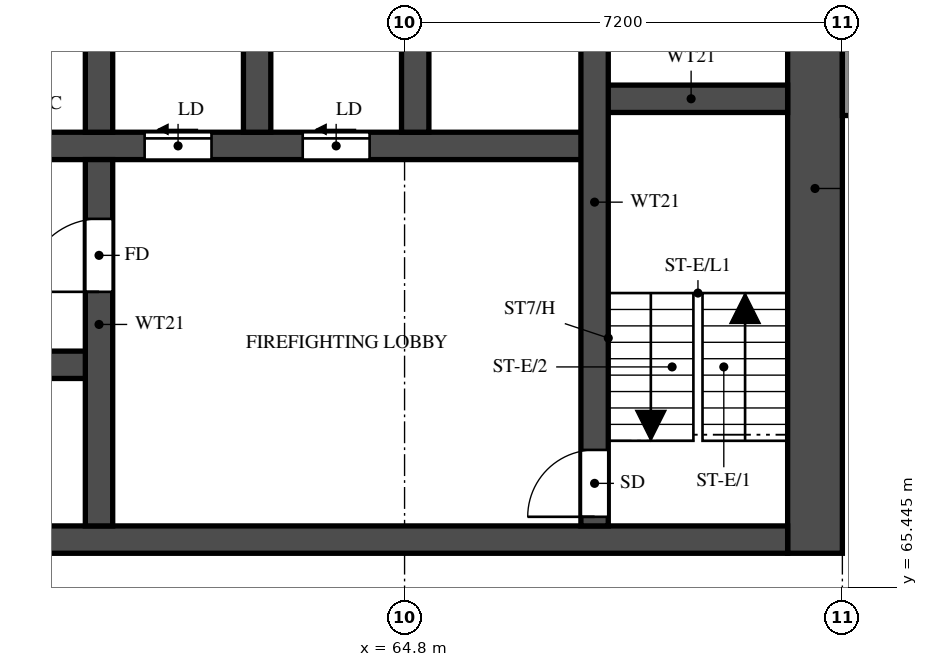
"""IFC4 building model, lengths in metres.
Left out: names, types, materials, properties, quantities, classifications, styles, units other than length and angle.
Written with IfcOpenShell. Run it as: python <this file> out.ifc"""

import sys

from ifc_helpers import new_model, si_unit, direction, frame, frame_2d, origin, place, context, subcontext, project, spatial, rectangle, extrude, element, fill, save


model = new_model("IFC4")
c1 = context("Model", 3, precision=1e-05, world=origin(), true_north=direction((0.0, 1.0)))
c2 = subcontext(c1, "Body", "Model", "MODEL_VIEW")
j1 = project(units=[si_unit("LENGTHUNIT", "METRE"), si_unit("PLANEANGLEUNIT", "RADIAN")], contexts=[c1])
p1 = place(None, origin())
s1 = spatial("IfcSite", under=j1, at=p1, CompositionType="ELEMENT")
p2 = place(p1, origin())
s2 = spatial("IfcBuilding", under=s1, at=p2, CompositionType="ELEMENT")
p3 = place(p2, frame((0.0, 0.0, 37.5)))
s3 = spatial("IfcBuildingStorey", under=s2, at=p3, CompositionType="ELEMENT", Elevation=37.5)
p4 = place(p3, frame((71.55, 66.0, 0.0), z_axis=(0.0, 0.0, 1.0), x_axis=(0.0, 1.0, 0.0)))
e1 = element("IfcWall", 1, at=p4, inside=s3, PredefinedType="SHEAR", context=c2, shape_type="SweptSolid", body=[
    extrude(rectangle(XDim=12.0, YDim=0.9, at=frame_2d((6.0, 0.0))), origin(), (0.0, 0.0, 1.0), 3.18),
])
p5 = place(p3, frame((29.7, 66.225, 0.0), z_axis=(0.0, 0.0, 1.0), x_axis=(1.0, 0.0, 0.0)))
e2 = element("IfcWall", 2, at=p5, inside=s3, PredefinedType="SHEAR", context=c2, shape_type="SweptSolid", body=[
    extrude(rectangle(XDim=41.4, YDim=0.45, at=frame_2d((20.7, 0.0))), origin(), (0.0, 0.0, 1.0), 3.18),
])
p6 = place(p5, frame((0.925, 0.0, 0.0)))
e3 = element("IfcOpeningElement", 3, at=p6, cuts=e2, PredefinedType="OPENING", context=c2, shape_type="SweptSolid", body=[
    extrude(rectangle(XDim=1.1, YDim=2.1, at=frame_2d((0.55, 1.05))), frame((0.0, 0.235, 0.0), z_axis=(0.0, -1.0, 0.0), x_axis=(1.0, 0.0, 0.0)), (0.0, 0.0, 1.0), 0.47),
])
p7 = place(p5, frame((3.738, 0.0, 0.0)))
e4 = element("IfcOpeningElement", 4, at=p7, cuts=e2, PredefinedType="OPENING", context=c2, shape_type="SweptSolid", body=[
    extrude(rectangle(XDim=1.8, YDim=2.1, at=frame_2d((0.9, 1.05))), frame((0.0, 0.235, 0.0), z_axis=(0.0, -1.0, 0.0), x_axis=(1.0, 0.0, 0.0)), (0.0, 0.0, 1.0), 0.47),
])
p8 = place(p3, frame((35.575, 69.1, 0.0), z_axis=(0.0, 0.0, 1.0), x_axis=(1.0, 0.0, 0.0)))
e5 = element("IfcWall", 5, at=p8, inside=s3, PredefinedType="SHEAR", context=c2, shape_type="SweptSolid", body=[
    extrude(rectangle(XDim=24.2, YDim=0.45, at=frame_2d((12.1, 0.0))), origin(), (0.0, 0.0, 1.0), 3.18),
])
p9 = place(p8, frame((1.05, 0.0, 0.0)))
e6 = element("IfcOpeningElement", 6, at=p9, cuts=e5, PredefinedType="OPENING", context=c2, shape_type="SweptSolid", body=[
    extrude(rectangle(XDim=1.1, YDim=2.1, at=frame_2d((0.55, 1.05))), frame((0.0, 0.235, 0.0), z_axis=(0.0, -1.0, 0.0), x_axis=(1.0, 0.0, 0.0)), (0.0, 0.0, 1.0), 0.47),
])
p10 = place(p8, frame((3.8, 0.0, 0.0)))
e7 = element("IfcOpeningElement", 7, at=p10, cuts=e5, PredefinedType="OPENING", context=c2, shape_type="SweptSolid", body=[
    extrude(rectangle(XDim=1.1, YDim=2.1, at=frame_2d((0.55, 1.05))), frame((0.0, 0.235, 0.0), z_axis=(0.0, -1.0, 0.0), x_axis=(1.0, 0.0, 0.0)), (0.0, 0.0, 1.0), 0.47),
])
p11 = place(p8, frame((6.55, 0.0, 0.0)))
e8 = element("IfcOpeningElement", 8, at=p11, cuts=e5, PredefinedType="OPENING", context=c2, shape_type="SweptSolid", body=[
    extrude(rectangle(XDim=1.1, YDim=2.1, at=frame_2d((0.55, 1.05))), frame((0.0, 0.235, 0.0), z_axis=(0.0, -1.0, 0.0), x_axis=(1.0, 0.0, 0.0)), (0.0, 0.0, 1.0), 0.47),
])
p12 = place(p8, frame((9.3, 0.0, 0.0)))
e9 = element("IfcOpeningElement", 9, at=p12, cuts=e5, PredefinedType="OPENING", context=c2, shape_type="SweptSolid", body=[
    extrude(rectangle(XDim=1.1, YDim=2.1, at=frame_2d((0.55, 1.05))), frame((0.0, 0.235, 0.0), z_axis=(0.0, -1.0, 0.0), x_axis=(1.0, 0.0, 0.0)), (0.0, 0.0, 1.0), 0.47),
])
p13 = place(p8, frame((12.05, 0.0, 0.0)))
e10 = element("IfcOpeningElement", 10, at=p13, cuts=e5, PredefinedType="OPENING", context=c2, shape_type="SweptSolid", body=[
    extrude(rectangle(XDim=1.1, YDim=2.1, at=frame_2d((0.55, 1.05))), frame((0.0, 0.235, 0.0), z_axis=(0.0, -1.0, 0.0), x_axis=(1.0, 0.0, 0.0)), (0.0, 0.0, 1.0), 0.47),
])
p14 = place(p8, frame((14.8, 0.0, 0.0)))
e11 = element("IfcOpeningElement", 11, at=p14, cuts=e5, PredefinedType="OPENING", context=c2, shape_type="SweptSolid", body=[
    extrude(rectangle(XDim=1.1, YDim=2.1, at=frame_2d((0.55, 1.05))), frame((0.0, 0.235, 0.0), z_axis=(0.0, -1.0, 0.0), x_axis=(1.0, 0.0, 0.0)), (0.0, 0.0, 1.0), 0.47),
])
p15 = place(p3, frame((32.875, 72.7, 0.0), z_axis=(0.0, 0.0, 1.0), x_axis=(1.0, 0.0, 0.0)))
e12 = element("IfcWall", 12, at=p15, inside=s3, PredefinedType="SHEAR", context=c2, shape_type="SweptSolid", body=[
    extrude(rectangle(XDim=35.05, YDim=0.45, at=frame_2d((17.525, 0.0))), origin(), (0.0, 0.0, 1.0), 3.18),
])
p16 = place(p15, frame((19.8, 0.0, 0.0)))
e13 = element("IfcOpeningElement", 13, at=p16, cuts=e12, PredefinedType="OPENING", context=c2, shape_type="SweptSolid", body=[
    extrude(rectangle(XDim=1.1, YDim=2.1, at=frame_2d((0.55, 1.05))), frame((0.0, 0.235, 0.0), z_axis=(0.0, -1.0, 0.0), x_axis=(1.0, 0.0, 0.0)), (0.0, 0.0, 1.0), 0.47),
])
p17 = place(p15, frame((27.65, 0.0, 0.0)))
e14 = element("IfcOpeningElement", 14, at=p17, cuts=e12, PredefinedType="OPENING", context=c2, shape_type="SweptSolid", body=[
    extrude(rectangle(XDim=1.1, YDim=2.1, at=frame_2d((0.55, 1.05))), frame((0.0, 0.235, 0.0), z_axis=(0.0, -1.0, 0.0), x_axis=(1.0, 0.0, 0.0)), (0.0, 0.0, 1.0), 0.47),
])
p18 = place(p15, frame((30.25, 0.0, 0.0)))
e15 = element("IfcOpeningElement", 15, at=p18, cuts=e12, PredefinedType="OPENING", context=c2, shape_type="SweptSolid", body=[
    extrude(rectangle(XDim=1.1, YDim=2.1, at=frame_2d((0.55, 1.05))), frame((0.0, 0.235, 0.0), z_axis=(0.0, -1.0, 0.0), x_axis=(1.0, 0.0, 0.0)), (0.0, 0.0, 1.0), 0.47),
])
p19 = place(p15, frame((3.75, 0.0, 0.0)))
e16 = element("IfcOpeningElement", 16, at=p19, cuts=e12, PredefinedType="OPENING", context=c2, shape_type="SweptSolid", body=[
    extrude(rectangle(XDim=1.1, YDim=2.1, at=frame_2d((0.55, 1.05))), frame((0.0, 0.235, 0.0), z_axis=(0.0, -1.0, 0.0), x_axis=(1.0, 0.0, 0.0)), (0.0, 0.0, 1.0), 0.47),
])
p20 = place(p15, frame((6.5, 0.0, 0.0)))
e17 = element("IfcOpeningElement", 17, at=p20, cuts=e12, PredefinedType="OPENING", context=c2, shape_type="SweptSolid", body=[
    extrude(rectangle(XDim=1.1, YDim=2.1, at=frame_2d((0.55, 1.05))), frame((0.0, 0.235, 0.0), z_axis=(0.0, -1.0, 0.0), x_axis=(1.0, 0.0, 0.0)), (0.0, 0.0, 1.0), 0.47),
])
p21 = place(p15, frame((9.25, 0.0, 0.0)))
e18 = element("IfcOpeningElement", 18, at=p21, cuts=e12, PredefinedType="OPENING", context=c2, shape_type="SweptSolid", body=[
    extrude(rectangle(XDim=1.1, YDim=2.1, at=frame_2d((0.55, 1.05))), frame((0.0, 0.235, 0.0), z_axis=(0.0, -1.0, 0.0), x_axis=(1.0, 0.0, 0.0)), (0.0, 0.0, 1.0), 0.47),
])
p22 = place(p15, frame((12.0, 0.0, 0.0)))
e19 = element("IfcOpeningElement", 19, at=p22, cuts=e12, PredefinedType="OPENING", context=c2, shape_type="SweptSolid", body=[
    extrude(rectangle(XDim=1.1, YDim=2.1, at=frame_2d((0.55, 1.05))), frame((0.0, 0.235, 0.0), z_axis=(0.0, -1.0, 0.0), x_axis=(1.0, 0.0, 0.0)), (0.0, 0.0, 1.0), 0.47),
])
p23 = place(p15, frame((14.75, 0.0, 0.0)))
e20 = element("IfcOpeningElement", 20, at=p23, cuts=e12, PredefinedType="OPENING", context=c2, shape_type="SweptSolid", body=[
    extrude(rectangle(XDim=1.1, YDim=2.1, at=frame_2d((0.55, 1.05))), frame((0.0, 0.235, 0.0), z_axis=(0.0, -1.0, 0.0), x_axis=(1.0, 0.0, 0.0)), (0.0, 0.0, 1.0), 0.47),
])
p24 = place(p15, frame((17.5, 0.0, 0.0)))
e21 = element("IfcOpeningElement", 21, at=p24, cuts=e12, PredefinedType="OPENING", context=c2, shape_type="SweptSolid", body=[
    extrude(rectangle(XDim=1.1, YDim=2.1, at=frame_2d((0.55, 1.05))), frame((0.0, 0.235, 0.0), z_axis=(0.0, -1.0, 0.0), x_axis=(1.0, 0.0, 0.0)), (0.0, 0.0, 1.0), 0.47),
])
p25 = place(p15, frame((0.913, 0.0, 0.0)))
e22 = element("IfcOpeningElement", 22, at=p25, cuts=e12, PredefinedType="OPENING", context=c2, shape_type="SweptSolid", body=[
    extrude(rectangle(XDim=1.1, YDim=2.1, at=frame_2d((0.55, 1.05))), frame((0.0, 0.235, 0.0), z_axis=(0.0, -1.0, 0.0), x_axis=(1.0, 0.0, 0.0)), (0.0, 0.0, 1.0), 0.47),
])
p26 = place(p3, frame((67.925, 73.475, 0.0), z_axis=(0.0, 0.0, 1.0), x_axis=(1.0, 0.0, 0.0)))
e23 = element("IfcWall", 23, at=p26, inside=s3, PredefinedType="SHEAR", context=c2, shape_type="SweptSolid", body=[
    extrude(rectangle(XDim=3.175, YDim=0.45, at=frame_2d((1.587, 0.0))), origin(), (0.0, 0.0, 1.0), 3.18),
])
p27 = place(p3, frame((67.925, 66.45, 0.0), z_axis=(0.0, 0.0, 1.0), x_axis=(0.0, 1.0, 0.0)))
e24 = element("IfcWall", 24, at=p27, inside=s3, PredefinedType="SHEAR", context=c2, shape_type="SweptSolid", body=[
    extrude(rectangle(XDim=10.65, YDim=0.45, at=frame_2d((5.325, 0.0))), origin(), (0.0, 0.0, 1.0), 3.18),
])
p28 = place(p27, frame((0.15, 0.0, 0.0)))
e25 = element("IfcOpeningElement", 25, at=p28, cuts=e24, PredefinedType="OPENING", context=c2, shape_type="SweptSolid", body=[
    extrude(rectangle(XDim=1.1, YDim=2.1, at=frame_2d((0.55, 1.05))), frame((0.0, 0.235, 0.0), z_axis=(0.0, -1.0, 0.0), x_axis=(1.0, 0.0, 0.0)), (0.0, 0.0, 1.0), 0.47),
])
p29 = place(p3, frame((59.775, 66.45, 0.0), z_axis=(0.0, 0.0, 1.0), x_axis=(0.0, 1.0, 0.0)))
e26 = element("IfcWall", 26, at=p29, inside=s3, PredefinedType="SHEAR", context=c2, shape_type="SweptSolid", body=[
    extrude(rectangle(XDim=6.025, YDim=0.45, at=frame_2d((3.013, 0.0))), origin(), (0.0, 0.0, 1.0), 3.18),
])
p30 = place(p29, frame((3.85, 0.0, 0.0)))
e27 = element("IfcOpeningElement", 27, at=p30, cuts=e26, PredefinedType="OPENING", context=c2, shape_type="SweptSolid", body=[
    extrude(rectangle(XDim=1.2, YDim=2.1, at=frame_2d((0.6, 1.05))), frame((0.0, 0.235, 0.0), z_axis=(0.0, -1.0, 0.0), x_axis=(1.0, 0.0, 0.0)), (0.0, 0.0, 1.0), 0.47),
])
for number, where, z_axis, x_axis in (
    (28, (59.775, 72.925, 0.0), (0.0, 0.0, 1.0), (0.0, 1.0, 0.0)),
    (29, (62.375, 72.925, 0.0), (0.0, 0.0, 1.0), (0.0, 1.0, 0.0)),
    (30, (64.975, 72.925, 0.0), (0.0, 0.0, 1.0), (0.0, 1.0, 0.0)),
):
    element("IfcWall", number, at=place(p3, frame(where, z_axis=z_axis, x_axis=x_axis)), inside=s3, PredefinedType="SHEAR", context=c2, shape_type="SweptSolid", body=[
        extrude(rectangle(XDim=2.95, YDim=0.45, at=frame_2d((1.475, 0.0))), origin(), (0.0, 0.0, 1.0), 3.18),
    ])
p31 = place(p3, frame((72.1, 73.2, 0.0), z_axis=(0.0, 0.0, 1.0), x_axis=(0.0, 1.0, 0.0)))
e31 = element("IfcWall", 31, at=p31, inside=s3, PredefinedType="SOLIDWALL", context=c2, shape_type="SweptSolid", body=[
    extrude(rectangle(XDim=4.8, YDim=0.2, at=frame_2d((2.4, 0.0))), origin(), (0.0, 0.0, 1.0), 3.18),
])
p32 = place(p28, origin())
e32 = element("IfcDoor", 32, at=p32, inside=s3, OperationType="SINGLE_SWING_LEFT", PredefinedType="DOOR", context=c2, shape_type="SweptSolid", body=[
    extrude(rectangle(XDim=1.1, YDim=2.1, at=frame_2d((0.55, 1.05))), frame((0.0, 0.025, 0.0), z_axis=(0.0, -1.0, 0.0), x_axis=(1.0, 0.0, 0.0)), (0.0, 0.0, 1.0), 0.05),
])
fill(e25, e32)
p33 = place(p30, origin())
e33 = element("IfcDoor", 33, at=p33, inside=s3, OperationType="SINGLE_SWING_RIGHT", PredefinedType="DOOR", context=c2, shape_type="SweptSolid", body=[
    extrude(rectangle(XDim=1.2, YDim=2.1, at=frame_2d((0.6, 1.05))), frame((0.0, 0.025, 0.0), z_axis=(0.0, -1.0, 0.0), x_axis=(1.0, 0.0, 0.0)), (0.0, 0.0, 1.0), 0.05),
])
fill(e27, e33)
p34 = place(p17, origin())
e34 = element("IfcDoor", 34, at=p34, inside=s3, OperationType="SLIDING_TO_LEFT", PredefinedType="DOOR", context=c2, shape_type="SweptSolid", body=[
    extrude(rectangle(XDim=1.1, YDim=2.1, at=frame_2d((0.55, 1.05))), frame((0.0, 0.025, 0.0), z_axis=(0.0, -1.0, 0.0), x_axis=(1.0, 0.0, 0.0)), (0.0, 0.0, 1.0), 0.05),
])
fill(e14, e34)
p35 = place(p18, origin())
e35 = element("IfcDoor", 35, at=p35, inside=s3, OperationType="SLIDING_TO_LEFT", PredefinedType="DOOR", context=c2, shape_type="SweptSolid", body=[
    extrude(rectangle(XDim=1.1, YDim=2.1, at=frame_2d((0.55, 1.05))), frame((0.0, 0.025, 0.0), z_axis=(0.0, -1.0, 0.0), x_axis=(1.0, 0.0, 0.0)), (0.0, 0.0, 1.0), 0.05),
])
fill(e15, e35)
save(model, sys.argv[1])
